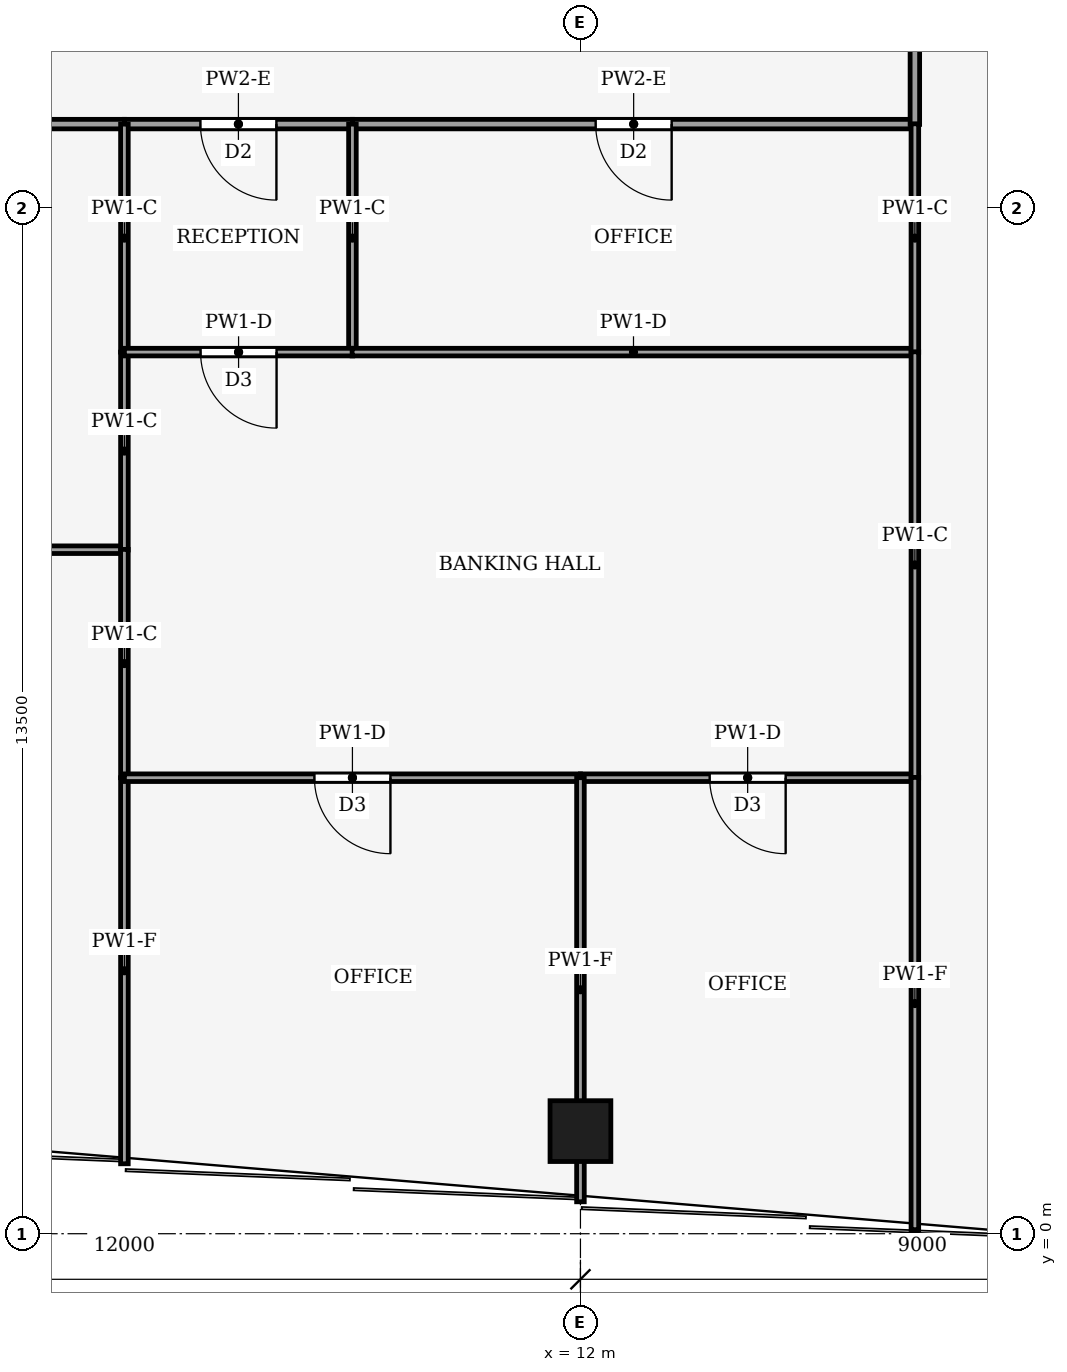
"""IFC4 building model, lengths in metres.
Left out: names, types, materials, properties, quantities, classifications, styles, units other than length and angle.
Written with IfcOpenShell. Run it as: python <this file> out.ifc"""

import sys

from ifc_helpers import new_model, si_unit, direction, frame, frame_2d, origin, origin_2d, place, context, subcontext, project, spatial, rectangle, hollow_rectangle, extrude, element, fill, save


model = new_model("IFC4")
c1 = context("Model", 3, precision=1e-05, world=origin(), true_north=direction((0.0, 1.0)))
c2 = subcontext(c1, "Body", "Model", "MODEL_VIEW")
j1 = project(units=[si_unit("LENGTHUNIT", "METRE"), si_unit("PLANEANGLEUNIT", "RADIAN")], contexts=[c1])
p1 = place(None, origin())
s1 = spatial("IfcSite", under=j1, at=p1, CompositionType="ELEMENT")
p2 = place(p1, origin())
s2 = spatial("IfcBuilding", under=s1, at=p2, CompositionType="ELEMENT")
p3 = place(p2, frame((0.0, 0.0, 22.0)))
s3 = spatial("IfcBuildingStorey", under=s2, at=p3, CompositionType="ELEMENT", Elevation=22.0)
p4 = place(p3, frame((12.0, 1.35, 0.0), z_axis=(0.0, 0.0, 1.0), x_axis=(1.0, 0.0, 0.0)))
e1 = element("IfcColumn", 1, at=p4, inside=s3, PredefinedType="COLUMN", context=c2, shape_type="SweptSolid", body=[
    extrude(hollow_rectangle(XDim=0.8, YDim=0.8, WallThickness=0.04, at=origin_2d()), origin(), (0.0, 0.0, 1.0), 4.0),
])
p5 = place(p3, frame((-6.0, 14.6, 0.0), z_axis=(0.0, 0.0, 1.0), x_axis=(1.0, 0.0, 0.0)))
e2 = element("IfcWall", 2, at=p5, inside=s3, PredefinedType="PARTITIONING", context=c2, shape_type="SweptSolid", body=[
    extrude(rectangle(XDim=12.0, YDim=0.125, at=frame_2d((6.0, 0.0))), origin(), (0.0, 0.0, 1.0), 3.29),
])
p6 = place(p5, frame((5.5, 0.0, 0.0)))
e3 = element("IfcOpeningElement", 3, at=p6, cuts=e2, PredefinedType="OPENING", context=c2, shape_type="SweptSolid", body=[
    extrude(rectangle(XDim=1.0, YDim=2.1, at=frame_2d((0.5, 1.05))), frame((0.0, 0.073, 0.0), z_axis=(0.0, -1.0, 0.0), x_axis=(1.0, 0.0, 0.0)), (0.0, 0.0, 1.0), 0.145),
])
p7 = place(p3, frame((9.0, 14.6, 0.0), z_axis=(0.0, 0.0, 1.0), x_axis=(-1.0, 0.0, 0.0)))
e4 = element("IfcWall", 4, at=p7, inside=s3, PredefinedType="PARTITIONING", context=c2, shape_type="SweptSolid", body=[
    extrude(rectangle(XDim=3.0, YDim=0.125, at=frame_2d((1.5, 0.0))), origin(), (0.0, 0.0, 1.0), 3.29),
])
p8 = place(p7, frame((1.0, 0.0, 0.0)))
e5 = element("IfcOpeningElement", 5, at=p8, cuts=e4, PredefinedType="OPENING", context=c2, shape_type="SweptSolid", body=[
    extrude(rectangle(XDim=1.0, YDim=2.1, at=frame_2d((0.5, 1.05))), frame((0.0, 0.073, 0.0), z_axis=(0.0, -1.0, 0.0), x_axis=(1.0, 0.0, 0.0)), (0.0, 0.0, 1.0), 0.145),
])
p9 = place(p3, frame((16.4, 14.6, 0.0), z_axis=(0.0, 0.0, 1.0), x_axis=(-1.0, 0.0, 0.0)))
e6 = element("IfcWall", 6, at=p9, inside=s3, PredefinedType="PARTITIONING", context=c2, shape_type="SweptSolid", body=[
    extrude(rectangle(XDim=7.4, YDim=0.125, at=frame_2d((3.7, 0.0))), origin(), (0.0, 0.0, 1.0), 3.29),
])
p10 = place(p9, frame((3.2, 0.0, 0.0)))
e7 = element("IfcOpeningElement", 7, at=p10, cuts=e6, PredefinedType="OPENING", context=c2, shape_type="SweptSolid", body=[
    extrude(rectangle(XDim=1.0, YDim=2.1, at=frame_2d((0.5, 1.05))), frame((0.0, 0.073, 0.0), z_axis=(0.0, -1.0, 0.0), x_axis=(1.0, 0.0, 0.0)), (0.0, 0.0, 1.0), 0.145),
])
p11 = place(p3, frame((16.4, 24.0, 0.0), z_axis=(0.0, 0.0, 1.0), x_axis=(0.0, -1.0, 0.0)))
e8 = element("IfcWall", 8, at=p11, inside=s3, PredefinedType="PARTITIONING", context=c2, shape_type="SweptSolid", body=[
    extrude(rectangle(XDim=9.404, YDim=0.125, at=frame_2d((4.702, 0.0))), origin(), (0.0, 0.0, 1.0), 3.14),
])
p12 = place(p11, frame((4.202, 0.0, 0.0)))
e9 = element("IfcOpeningElement", 9, at=p12, cuts=e8, PredefinedType="OPENING", context=c2, shape_type="SweptSolid", body=[
    extrude(rectangle(XDim=1.0, YDim=2.1, at=frame_2d((0.5, 1.05))), frame((0.0, 0.073, 0.0), z_axis=(0.0, -1.0, 0.0), x_axis=(1.0, 0.0, 0.0)), (0.0, 0.0, 1.0), 0.145),
])
p13 = place(p3, frame((6.0, 9.0, 0.0), z_axis=(0.0, 0.0, 1.0), x_axis=(-1.0, 0.0, 0.0)))
e10 = element("IfcWall", 10, at=p13, inside=s3, PredefinedType="PARTITIONING", context=c2, shape_type="SweptSolid", body=[
    extrude(rectangle(XDim=6.0, YDim=0.1, at=frame_2d((3.0, 0.0))), origin(), (0.0, 0.0, 1.0), 3.29),
])
p14 = place(p13, frame((2.5, 0.0, 0.0)))
e11 = element("IfcOpeningElement", 11, at=p14, cuts=e10, PredefinedType="OPENING", context=c2, shape_type="SweptSolid", body=[
    extrude(rectangle(XDim=1.0, YDim=2.1, at=frame_2d((0.5, 1.05))), frame((0.0, 0.06, 0.0), z_axis=(0.0, -1.0, 0.0), x_axis=(1.0, 0.0, 0.0)), (0.0, 0.0, 1.0), 0.12),
])
p15 = place(p3, frame((6.0, 11.6, 0.0), z_axis=(0.0, 0.0, 1.0), x_axis=(0.0, 1.0, 0.0)))
e12 = element("IfcWall", 12, at=p15, inside=s3, PredefinedType="PARTITIONING", context=c2, shape_type="SweptSolid", body=[
    extrude(rectangle(XDim=3.0, YDim=0.1, at=frame_2d((1.5, 0.0))), origin(), (0.0, 0.0, 1.0), 3.87),
])
p16 = place(p3, frame((6.0, 8.996, 0.0), z_axis=(0.0, 0.0, 1.0), x_axis=(0.0, 1.0, 0.0)))
e13 = element("IfcWall", 13, at=p16, inside=s3, PredefinedType="PARTITIONING", context=c2, shape_type="SweptSolid", body=[
    extrude(rectangle(XDim=2.604, YDim=0.1, at=frame_2d((1.302, 0.0))), origin(), (0.0, 0.0, 1.0), 3.87),
])
p17 = place(p3, frame((6.0, 6.0, 0.0), z_axis=(0.0, 0.0, 1.0), x_axis=(0.0, 1.0, 0.0)))
e14 = element("IfcWall", 14, at=p17, inside=s3, PredefinedType="PARTITIONING", context=c2, shape_type="SweptSolid", body=[
    extrude(rectangle(XDim=3.004, YDim=0.1, at=frame_2d((1.502, 0.0))), origin(), (0.0, 0.0, 1.0), 3.87),
])
p18 = place(p3, frame((6.0, 0.92, 0.0), z_axis=(0.0, 0.0, 1.0), x_axis=(0.0, 1.0, 0.0)))
e15 = element("IfcWall", 15, at=p18, inside=s3, PredefinedType="PARTITIONING", context=c2, shape_type="SweptSolid", body=[
    extrude(rectangle(XDim=5.08, YDim=0.1, at=frame_2d((2.54, 0.0))), origin(), (0.0, 0.0, 1.0), 3.04),
])
p19 = place(p3, frame((9.0, 11.6, 0.0), z_axis=(0.0, 0.0, 1.0), x_axis=(0.0, 1.0, 0.0)))
e16 = element("IfcWall", 16, at=p19, inside=s3, PredefinedType="PARTITIONING", context=c2, shape_type="SweptSolid", body=[
    extrude(rectangle(XDim=3.0, YDim=0.1, at=frame_2d((1.5, 0.0))), origin(), (0.0, 0.0, 1.0), 3.87),
])
p20 = place(p3, frame((9.004, 11.6, 0.0), z_axis=(0.0, 0.0, 1.0), x_axis=(-1.0, 0.0, 0.0)))
e17 = element("IfcWall", 17, at=p20, inside=s3, PredefinedType="PARTITIONING", context=c2, shape_type="SweptSolid", body=[
    extrude(rectangle(XDim=3.004, YDim=0.1, at=frame_2d((1.502, 0.0))), origin(), (0.0, 0.0, 1.0), 3.29),
])
p21 = place(p20, frame((1.002, 0.0, 0.0)))
e18 = element("IfcOpeningElement", 18, at=p21, cuts=e17, PredefinedType="OPENING", context=c2, shape_type="SweptSolid", body=[
    extrude(rectangle(XDim=1.0, YDim=2.1, at=frame_2d((0.5, 1.05))), frame((0.0, 0.06, 0.0), z_axis=(0.0, -1.0, 0.0), x_axis=(1.0, 0.0, 0.0)), (0.0, 0.0, 1.0), 0.12),
])
p22 = place(p3, frame((8.996, 11.6, 0.0), z_axis=(0.0, 0.0, 1.0), x_axis=(1.0, 0.0, 0.0)))
e19 = element("IfcWall", 19, at=p22, inside=s3, PredefinedType="PARTITIONING", context=c2, shape_type="SweptSolid", body=[
    extrude(rectangle(XDim=7.404, YDim=0.1, at=frame_2d((3.702, 0.0))), origin(), (0.0, 0.0, 1.0), 3.29),
])
p23 = place(p3, frame((16.4, 11.596, 0.0), z_axis=(0.0, 0.0, 1.0), x_axis=(0.0, 1.0, 0.0)))
e20 = element("IfcWall", 20, at=p23, inside=s3, PredefinedType="PARTITIONING", context=c2, shape_type="SweptSolid", body=[
    extrude(rectangle(XDim=3.008, YDim=0.1, at=frame_2d((1.504, 0.0))), origin(), (0.0, 0.0, 1.0), 3.87),
])
p24 = place(p3, frame((12.0, 6.0, 0.0), z_axis=(0.0, 0.0, 1.0), x_axis=(-1.0, 0.0, 0.0)))
e21 = element("IfcWall", 21, at=p24, inside=s3, PredefinedType="PARTITIONING", context=c2, shape_type="SweptSolid", body=[
    extrude(rectangle(XDim=6.0, YDim=0.1, at=frame_2d((3.0, 0.0))), origin(), (0.0, 0.0, 1.0), 3.29),
])
p25 = place(p24, frame((2.5, 0.0, 0.0)))
e22 = element("IfcOpeningElement", 22, at=p25, cuts=e21, PredefinedType="OPENING", context=c2, shape_type="SweptSolid", body=[
    extrude(rectangle(XDim=1.0, YDim=2.1, at=frame_2d((0.5, 1.05))), frame((0.0, 0.06, 0.0), z_axis=(0.0, -1.0, 0.0), x_axis=(1.0, 0.0, 0.0)), (0.0, 0.0, 1.0), 0.12),
])
p26 = place(p3, frame((16.4, 6.0, 0.0), z_axis=(0.0, 0.0, 1.0), x_axis=(-1.0, 0.0, 0.0)))
e23 = element("IfcWall", 23, at=p26, inside=s3, PredefinedType="PARTITIONING", context=c2, shape_type="SweptSolid", body=[
    extrude(rectangle(XDim=4.4, YDim=0.1, at=frame_2d((2.2, 0.0))), origin(), (0.0, 0.0, 1.0), 3.29),
])
p27 = place(p26, frame((1.7, 0.0, 0.0)))
e24 = element("IfcOpeningElement", 24, at=p27, cuts=e23, PredefinedType="OPENING", context=c2, shape_type="SweptSolid", body=[
    extrude(rectangle(XDim=1.0, YDim=2.1, at=frame_2d((0.5, 1.05))), frame((0.0, 0.06, 0.0), z_axis=(0.0, -1.0, 0.0), x_axis=(1.0, 0.0, 0.0)), (0.0, 0.0, 1.0), 0.12),
])
p28 = place(p3, frame((16.4, 5.996, 0.0), z_axis=(0.0, 0.0, 1.0), x_axis=(0.0, 1.0, 0.0)))
e25 = element("IfcWall", 25, at=p28, inside=s3, PredefinedType="PARTITIONING", context=c2, shape_type="SweptSolid", body=[
    extrude(rectangle(XDim=5.608, YDim=0.1, at=frame_2d((2.804, 0.0))), origin(), (0.0, 0.0, 1.0), 3.87),
])
p29 = place(p3, frame((12.0, 0.42, 0.0), z_axis=(0.0, 0.0, 1.0), x_axis=(0.0, 1.0, 0.0)))
e26 = element("IfcWall", 26, at=p29, inside=s3, PredefinedType="PARTITIONING", context=c2, shape_type="SweptSolid", body=[
    extrude(rectangle(XDim=5.58, YDim=0.1, at=frame_2d((2.79, 0.0))), origin(), (0.0, 0.0, 1.0), 3.04),
])
p30 = place(p3, frame((16.4, 0.053, 0.0), z_axis=(0.0, 0.0, 1.0), x_axis=(0.0, 1.0, 0.0)))
e27 = element("IfcWall", 27, at=p30, inside=s3, PredefinedType="PARTITIONING", context=c2, shape_type="SweptSolid", body=[
    extrude(rectangle(XDim=5.951, YDim=0.1, at=frame_2d((2.975, 0.0))), origin(), (0.0, 0.0, 1.0), 3.04),
])
p31 = place(p8, origin())
e28 = element("IfcDoor", 28, at=p31, inside=s3, OperationType="SINGLE_SWING_RIGHT", PredefinedType="DOOR", context=c2, shape_type="SweptSolid", body=[
    extrude(rectangle(XDim=1.0, YDim=2.1, at=frame_2d((0.5, 1.05))), frame((0.0, 0.025, 0.0), z_axis=(0.0, -1.0, 0.0), x_axis=(1.0, 0.0, 0.0)), (0.0, 0.0, 1.0), 0.05),
])
fill(e5, e28)
p32 = place(p10, origin())
e29 = element("IfcDoor", 29, at=p32, inside=s3, OperationType="SINGLE_SWING_LEFT", PredefinedType="DOOR", context=c2, shape_type="SweptSolid", body=[
    extrude(rectangle(XDim=1.0, YDim=2.1, at=frame_2d((0.5, 1.05))), frame((0.0, 0.025, 0.0), z_axis=(0.0, -1.0, 0.0), x_axis=(1.0, 0.0, 0.0)), (0.0, 0.0, 1.0), 0.05),
])
fill(e7, e29)
p33 = place(p21, origin())
e30 = element("IfcDoor", 30, at=p33, inside=s3, OperationType="SINGLE_SWING_LEFT", PredefinedType="DOOR", context=c2, shape_type="SweptSolid", body=[
    extrude(rectangle(XDim=1.0, YDim=2.1, at=frame_2d((0.5, 1.05))), frame((0.0, 0.025, 0.0), z_axis=(0.0, -1.0, 0.0), x_axis=(1.0, 0.0, 0.0)), (0.0, 0.0, 1.0), 0.05),
])
fill(e18, e30)
p34 = place(p25, origin())
e31 = element("IfcDoor", 31, at=p34, inside=s3, OperationType="SINGLE_SWING_RIGHT", PredefinedType="DOOR", context=c2, shape_type="SweptSolid", body=[
    extrude(rectangle(XDim=1.0, YDim=2.1, at=frame_2d((0.5, 1.05))), frame((0.0, 0.025, 0.0), z_axis=(0.0, -1.0, 0.0), x_axis=(1.0, 0.0, 0.0)), (0.0, 0.0, 1.0), 0.05),
])
fill(e22, e31)
p35 = place(p27, origin())
e32 = element("IfcDoor", 32, at=p35, inside=s3, OperationType="SINGLE_SWING_LEFT", PredefinedType="DOOR", context=c2, shape_type="SweptSolid", body=[
    extrude(rectangle(XDim=1.0, YDim=2.1, at=frame_2d((0.5, 1.05))), frame((0.0, 0.025, 0.0), z_axis=(0.0, -1.0, 0.0), x_axis=(1.0, 0.0, 0.0)), (0.0, 0.0, 1.0), 0.05),
])
fill(e24, e32)
save(model, sys.argv[1])
